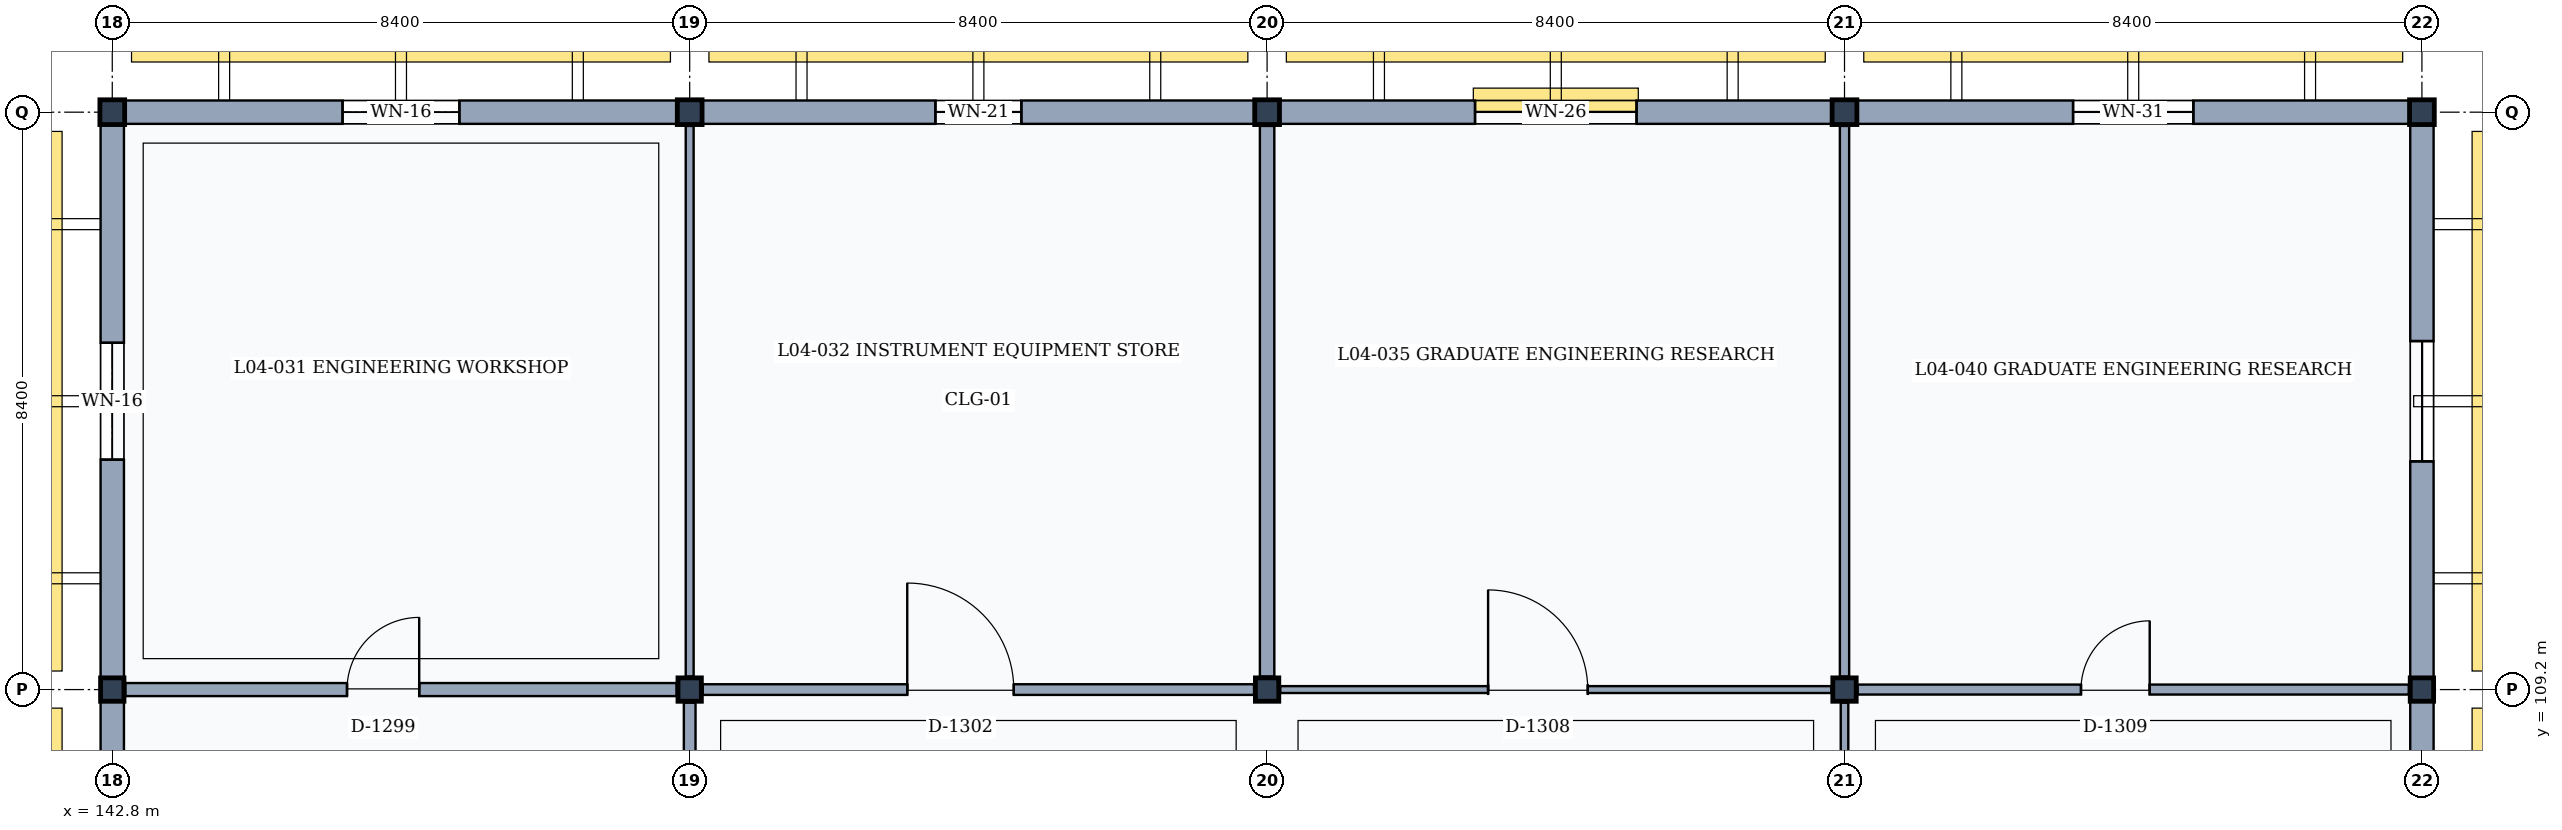
"""IFC4 building model, lengths in metres.
Left out: names, types, materials, properties, quantities, classifications, styles, units other than length and angle.
Written with IfcOpenShell. Run it as: python <this file> out.ifc"""

import sys

from ifc_helpers import new_model, si_unit, direction, frame, frame_2d, origin, origin_2d, place, context, subcontext, project, spatial, rectangle, extrude, element, fill, save


model = new_model("IFC4")
c1 = context("Model", 3, precision=1e-05, world=origin(), true_north=direction((0.0, 1.0)))
c2 = subcontext(c1, "Body", "Model", "MODEL_VIEW")
j1 = project(units=[si_unit("LENGTHUNIT", "METRE"), si_unit("PLANEANGLEUNIT", "RADIAN")], contexts=[c1])
p1 = place(None, origin())
s1 = spatial("IfcSite", under=j1, at=p1, CompositionType="ELEMENT")
p2 = place(p1, origin())
s2 = spatial("IfcBuilding", under=s1, at=p2, CompositionType="ELEMENT")
p3 = place(p2, frame((0.0, 0.0, 18.0)))
s3 = spatial("IfcBuildingStorey", under=s2, at=p3, CompositionType="ELEMENT", Elevation=18.0)
p4 = place(p3, frame((142.8, 109.2, 0.0), z_axis=(0.0, 0.0, 1.0), x_axis=(1.0, 0.0, 0.0)))
e1 = element("IfcColumn", 1, at=p4, inside=s3, PredefinedType="COLUMN", context=c2, shape_type="SweptSolid", body=[
    extrude(rectangle(XDim=0.34, YDim=0.34, at=origin_2d()), origin(), (0.0, 0.0, 1.0), 4.2),
])
p5 = place(p3, frame((142.8, 117.6, 0.0), z_axis=(0.0, 0.0, 1.0), x_axis=(1.0, 0.0, 0.0)))
e2 = element("IfcColumn", 2, at=p5, inside=s3, PredefinedType="COLUMN", context=c2, shape_type="SweptSolid", body=[
    extrude(rectangle(XDim=0.36, YDim=0.36, at=origin_2d()), origin(), (0.0, 0.0, 1.0), 4.2),
])
p6 = place(p3, frame((151.2, 109.2, 0.0), z_axis=(0.0, 0.0, 1.0), x_axis=(1.0, 0.0, 0.0)))
e3 = element("IfcColumn", 3, at=p6, inside=s3, PredefinedType="COLUMN", context=c2, shape_type="SweptSolid", body=[
    extrude(rectangle(XDim=0.34, YDim=0.34, at=origin_2d()), origin(), (0.0, 0.0, 1.0), 4.2),
])
p7 = place(p3, frame((151.2, 117.6, 0.0), z_axis=(0.0, 0.0, 1.0), x_axis=(1.0, 0.0, 0.0)))
e4 = element("IfcColumn", 4, at=p7, inside=s3, PredefinedType="COLUMN", context=c2, shape_type="SweptSolid", body=[
    extrude(rectangle(XDim=0.36, YDim=0.36, at=origin_2d()), origin(), (0.0, 0.0, 1.0), 4.2),
])
p8 = place(p3, frame((159.6, 109.2, 0.0), z_axis=(0.0, 0.0, 1.0), x_axis=(1.0, 0.0, 0.0)))
e5 = element("IfcColumn", 5, at=p8, inside=s3, PredefinedType="COLUMN", context=c2, shape_type="SweptSolid", body=[
    extrude(rectangle(XDim=0.34, YDim=0.34, at=origin_2d()), origin(), (0.0, 0.0, 1.0), 4.2),
])
p9 = place(p3, frame((159.6, 117.6, 0.0), z_axis=(0.0, 0.0, 1.0), x_axis=(1.0, 0.0, 0.0)))
e6 = element("IfcColumn", 6, at=p9, inside=s3, PredefinedType="COLUMN", context=c2, shape_type="SweptSolid", body=[
    extrude(rectangle(XDim=0.36, YDim=0.36, at=origin_2d()), origin(), (0.0, 0.0, 1.0), 4.2),
])
p10 = place(p3, frame((168.0, 109.2, 0.0), z_axis=(0.0, 0.0, 1.0), x_axis=(1.0, 0.0, 0.0)))
e7 = element("IfcColumn", 7, at=p10, inside=s3, PredefinedType="COLUMN", context=c2, shape_type="SweptSolid", body=[
    extrude(rectangle(XDim=0.34, YDim=0.34, at=origin_2d()), origin(), (0.0, 0.0, 1.0), 4.2),
])
p11 = place(p3, frame((168.0, 117.6, 0.0), z_axis=(0.0, 0.0, 1.0), x_axis=(1.0, 0.0, 0.0)))
e8 = element("IfcColumn", 8, at=p11, inside=s3, PredefinedType="COLUMN", context=c2, shape_type="SweptSolid", body=[
    extrude(rectangle(XDim=0.36, YDim=0.36, at=origin_2d()), origin(), (0.0, 0.0, 1.0), 4.2),
])
p12 = place(p3, frame((176.4, 109.2, 0.0), z_axis=(0.0, 0.0, 1.0), x_axis=(1.0, 0.0, 0.0)))
e9 = element("IfcColumn", 9, at=p12, inside=s3, PredefinedType="COLUMN", context=c2, shape_type="SweptSolid", body=[
    extrude(rectangle(XDim=0.34, YDim=0.34, at=origin_2d()), origin(), (0.0, 0.0, 1.0), 4.2),
])
p13 = place(p3, frame((176.4, 117.6, 0.0), z_axis=(0.0, 0.0, 1.0), x_axis=(1.0, 0.0, 0.0)))
e10 = element("IfcColumn", 10, at=p13, inside=s3, PredefinedType="COLUMN", context=c2, shape_type="SweptSolid", body=[
    extrude(rectangle(XDim=0.36, YDim=0.36, at=origin_2d()), origin(), (0.0, 0.0, 1.0), 4.2),
])
p14 = place(p3, frame((142.8, 100.98, 0.0), z_axis=(0.0, 0.0, 1.0), x_axis=(0.0, 1.0, 0.0)))
e11 = element("IfcWall", 11, at=p14, inside=s3, PredefinedType="SOLIDWALL", context=c2, shape_type="SweptSolid", body=[
    extrude(rectangle(XDim=8.05, YDim=0.34, at=frame_2d((4.025, 0.0))), origin(), (0.0, 0.0, 1.0), 3.36),
])
p15 = place(p14, frame((2.625, 0.0, 0.9)))
e12 = element("IfcOpeningElement", 12, at=p15, cuts=e11, PredefinedType="OPENING", context=c2, shape_type="SweptSolid", body=[
    extrude(rectangle(XDim=2.8, YDim=1.65, at=frame_2d((1.4, 0.825))), frame((0.0, 0.18, 0.0), z_axis=(0.0, -1.0, 0.0), x_axis=(1.0, 0.0, 0.0)), (0.0, 0.0, 1.0), 0.36),
])
p16 = place(p3, frame((142.98, 117.6, 0.0), z_axis=(0.0, 0.0, 1.0), x_axis=(1.0, 0.0, 0.0)))
e13 = element("IfcWall", 13, at=p16, inside=s3, PredefinedType="SOLIDWALL", context=c2, shape_type="SweptSolid", body=[
    extrude(rectangle(XDim=8.04, YDim=0.34, at=frame_2d((4.02, 0.0))), origin(), (0.0, 0.0, 1.0), 3.36),
])
p17 = place(p16, frame((3.17, 0.0, 0.9)))
e14 = element("IfcOpeningElement", 14, at=p17, cuts=e13, PredefinedType="OPENING", context=c2, shape_type="SweptSolid", body=[
    extrude(rectangle(XDim=1.7, YDim=1.55, at=frame_2d((0.85, 0.775))), frame((0.0, 0.18, 0.0), z_axis=(0.0, -1.0, 0.0), x_axis=(1.0, 0.0, 0.0)), (0.0, 0.0, 1.0), 0.36),
])
p18 = place(p3, frame((142.8, 109.37, 0.0), z_axis=(0.0, 0.0, 1.0), x_axis=(0.0, 1.0, 0.0)))
e15 = element("IfcWall", 15, at=p18, inside=s3, PredefinedType="SOLIDWALL", context=c2, shape_type="SweptSolid", body=[
    extrude(rectangle(XDim=8.05, YDim=0.34, at=frame_2d((4.025, 0.0))), origin(), (0.0, 0.0, 1.0), 3.36),
])
p19 = place(p18, frame((3.175, 0.0, 0.9)))
e16 = element("IfcOpeningElement", 16, at=p19, cuts=e15, PredefinedType="OPENING", context=c2, shape_type="SweptSolid", body=[
    extrude(rectangle(XDim=1.7, YDim=1.55, at=frame_2d((0.85, 0.775))), frame((0.0, 0.18, 0.0), z_axis=(0.0, -1.0, 0.0), x_axis=(1.0, 0.0, 0.0)), (0.0, 0.0, 1.0), 0.36),
])
p20 = place(p3, frame((151.38, 117.6, 0.0), z_axis=(0.0, 0.0, 1.0), x_axis=(1.0, 0.0, 0.0)))
e17 = element("IfcWall", 17, at=p20, inside=s3, PredefinedType="SOLIDWALL", context=c2, shape_type="SweptSolid", body=[
    extrude(rectangle(XDim=8.04, YDim=0.34, at=frame_2d((4.02, 0.0))), origin(), (0.0, 0.0, 1.0), 3.36),
])
p21 = place(p20, frame((3.395, 0.0, 0.9)))
e18 = element("IfcOpeningElement", 18, at=p21, cuts=e17, PredefinedType="OPENING", context=c2, shape_type="SweptSolid", body=[
    extrude(rectangle(XDim=1.25, YDim=1.7, at=frame_2d((0.625, 0.85))), frame((0.0, 0.18, 0.0), z_axis=(0.0, -1.0, 0.0), x_axis=(1.0, 0.0, 0.0)), (0.0, 0.0, 1.0), 0.36),
])
p22 = place(p3, frame((159.78, 117.6, 0.0), z_axis=(0.0, 0.0, 1.0), x_axis=(1.0, 0.0, 0.0)))
e19 = element("IfcWall", 19, at=p22, inside=s3, PredefinedType="SOLIDWALL", context=c2, shape_type="SweptSolid", body=[
    extrude(rectangle(XDim=8.04, YDim=0.34, at=frame_2d((4.02, 0.0))), origin(), (0.0, 0.0, 1.0), 3.36),
])
p23 = place(p22, frame((2.845, 0.0, 0.9)))
e20 = element("IfcOpeningElement", 20, at=p23, cuts=e19, PredefinedType="OPENING", context=c2, shape_type="SweptSolid", body=[
    extrude(rectangle(XDim=2.35, YDim=1.95, at=frame_2d((1.175, 0.975))), frame((0.0, 0.18, 0.0), z_axis=(0.0, -1.0, 0.0), x_axis=(1.0, 0.0, 0.0)), (0.0, 0.0, 1.0), 0.36),
])
p24 = place(p3, frame((176.4, 109.03, 0.0), z_axis=(0.0, 0.0, 1.0), x_axis=(0.0, -1.0, 0.0)))
e21 = element("IfcWall", 21, at=p24, inside=s3, PredefinedType="SOLIDWALL", context=c2, shape_type="SweptSolid", body=[
    extrude(rectangle(XDim=8.05, YDim=0.34, at=frame_2d((4.025, 0.0))), origin(), (0.0, 0.0, 1.0), 3.36),
])
p25 = place(p24, frame((2.65, 0.0, 0.9)))
e22 = element("IfcOpeningElement", 22, at=p25, cuts=e21, PredefinedType="OPENING", context=c2, shape_type="SweptSolid", body=[
    extrude(rectangle(XDim=2.75, YDim=1.85, at=frame_2d((1.375, 0.925))), frame((0.0, 0.18, 0.0), z_axis=(0.0, -1.0, 0.0), x_axis=(1.0, 0.0, 0.0)), (0.0, 0.0, 1.0), 0.36),
])
p26 = place(p3, frame((168.18, 117.6, 0.0), z_axis=(0.0, 0.0, 1.0), x_axis=(1.0, 0.0, 0.0)))
e23 = element("IfcWall", 23, at=p26, inside=s3, PredefinedType="SOLIDWALL", context=c2, shape_type="SweptSolid", body=[
    extrude(rectangle(XDim=8.04, YDim=0.34, at=frame_2d((4.02, 0.0))), origin(), (0.0, 0.0, 1.0), 3.36),
])
p27 = place(p26, frame((3.145, 0.0, 0.9)))
e24 = element("IfcOpeningElement", 24, at=p27, cuts=e23, PredefinedType="OPENING", context=c2, shape_type="SweptSolid", body=[
    extrude(rectangle(XDim=1.75, YDim=1.85, at=frame_2d((0.875, 0.925))), frame((0.0, 0.18, 0.0), z_axis=(0.0, -1.0, 0.0), x_axis=(1.0, 0.0, 0.0)), (0.0, 0.0, 1.0), 0.36),
])
p28 = place(p3, frame((176.4, 117.42, 0.0), z_axis=(0.0, 0.0, 1.0), x_axis=(0.0, -1.0, 0.0)))
e25 = element("IfcWall", 25, at=p28, inside=s3, PredefinedType="SOLIDWALL", context=c2, shape_type="SweptSolid", body=[
    extrude(rectangle(XDim=8.05, YDim=0.34, at=frame_2d((4.025, 0.0))), origin(), (0.0, 0.0, 1.0), 3.36),
])
p29 = place(p28, frame((3.15, 0.0, 0.9)))
e26 = element("IfcOpeningElement", 26, at=p29, cuts=e25, PredefinedType="OPENING", context=c2, shape_type="SweptSolid", body=[
    extrude(rectangle(XDim=1.75, YDim=1.85, at=frame_2d((0.875, 0.925))), frame((0.0, 0.18, 0.0), z_axis=(0.0, -1.0, 0.0), x_axis=(1.0, 0.0, 0.0)), (0.0, 0.0, 1.0), 0.36),
])
p30 = place(p3, frame((151.2, 101.0, 0.0), z_axis=(0.0, 0.0, 1.0), x_axis=(0.0, 1.0, 0.0)))
e27 = element("IfcWall", 27, at=p30, inside=s3, PredefinedType="PARTITIONING", context=c2, shape_type="SweptSolid", body=[
    extrude(rectangle(XDim=8.01, YDim=0.17, at=frame_2d((4.005, 0.0))), origin(), (0.0, 0.0, 1.0), 3.32),
])
p31 = place(p30, frame((2.925, 0.0, 0.0)))
e28 = element("IfcOpeningElement", 28, at=p31, cuts=e27, PredefinedType="OPENING", context=c2, shape_type="SweptSolid", body=[
    extrude(rectangle(XDim=1.65, YDim=2.25, at=frame_2d((0.825, 1.125))), frame((0.0, 0.095, 0.0), z_axis=(0.0, -1.0, 0.0), x_axis=(1.0, 0.0, 0.0)), (0.0, 0.0, 1.0), 0.19),
])
p32 = place(p3, frame((142.99, 109.2, 0.0), z_axis=(0.0, 0.0, 1.0), x_axis=(1.0, 0.0, 0.0)))
e29 = element("IfcWall", 29, at=p32, inside=s3, PredefinedType="PARTITIONING", context=c2, shape_type="SweptSolid", body=[
    extrude(rectangle(XDim=8.02, YDim=0.19, at=frame_2d((4.01, 0.0))), origin(), (0.0, 0.0, 1.0), 3.32),
])
p33 = place(p32, frame((3.225, 0.0, 0.0)))
e30 = element("IfcOpeningElement", 30, at=p33, cuts=e29, PredefinedType="OPENING", context=c2, shape_type="SweptSolid", body=[
    extrude(rectangle(XDim=1.05, YDim=2.2, at=frame_2d((0.525, 1.1))), frame((0.0, 0.105, 0.0), z_axis=(0.0, -1.0, 0.0), x_axis=(1.0, 0.0, 0.0)), (0.0, 0.0, 1.0), 0.21),
])
p34 = place(p3, frame((151.2, 109.39, 0.0), z_axis=(0.0, 0.0, 1.0), x_axis=(0.0, 1.0, 0.0)))
e31 = element("IfcWall", 31, at=p34, inside=s3, PredefinedType="PARTITIONING", context=c2, shape_type="SweptSolid", body=[
    extrude(rectangle(XDim=8.01, YDim=0.115, at=frame_2d((4.005, 0.0))), origin(), (0.0, 0.0, 1.0), 3.32),
])
p35 = place(p3, frame((151.39, 109.2, 0.0), z_axis=(0.0, 0.0, 1.0), x_axis=(1.0, 0.0, 0.0)))
e32 = element("IfcWall", 32, at=p35, inside=s3, PredefinedType="PARTITIONING", context=c2, shape_type="SweptSolid", body=[
    extrude(rectangle(XDim=8.02, YDim=0.155, at=frame_2d((4.01, 0.0))), origin(), (0.0, 0.0, 1.0), 3.32),
])
p36 = place(p35, frame((2.975, 0.0, 0.0)))
e33 = element("IfcOpeningElement", 33, at=p36, cuts=e32, PredefinedType="OPENING", context=c2, shape_type="SweptSolid", body=[
    extrude(rectangle(XDim=1.55, YDim=2.35, at=frame_2d((0.775, 1.175))), frame((0.0, 0.087, 0.0), z_axis=(0.0, -1.0, 0.0), x_axis=(1.0, 0.0, 0.0)), (0.0, 0.0, 1.0), 0.175),
])
p37 = place(p3, frame((159.6, 109.39, 0.0), z_axis=(0.0, 0.0, 1.0), x_axis=(0.0, 1.0, 0.0)))
e34 = element("IfcWall", 34, at=p37, inside=s3, PredefinedType="PARTITIONING", context=c2, shape_type="SweptSolid", body=[
    extrude(rectangle(XDim=8.01, YDim=0.21, at=frame_2d((4.005, 0.0))), origin(), (0.0, 0.0, 1.0), 3.32),
])
p38 = place(p3, frame((168.0, 101.0, 0.0), z_axis=(0.0, 0.0, 1.0), x_axis=(0.0, 1.0, 0.0)))
e35 = element("IfcWall", 35, at=p38, inside=s3, PredefinedType="PARTITIONING", context=c2, shape_type="SweptSolid", body=[
    extrude(rectangle(XDim=8.01, YDim=0.11, at=frame_2d((4.005, 0.0))), origin(), (0.0, 0.0, 1.0), 3.32),
])
p39 = place(p38, frame((3.075, 0.0, 0.0)))
e36 = element("IfcOpeningElement", 36, at=p39, cuts=e35, PredefinedType="OPENING", context=c2, shape_type="SweptSolid", body=[
    extrude(rectangle(XDim=1.35, YDim=2.25, at=frame_2d((0.675, 1.125))), frame((0.0, 0.065, 0.0), z_axis=(0.0, -1.0, 0.0), x_axis=(1.0, 0.0, 0.0)), (0.0, 0.0, 1.0), 0.13),
])
p40 = place(p3, frame((159.79, 109.2, 0.0), z_axis=(0.0, 0.0, 1.0), x_axis=(1.0, 0.0, 0.0)))
e37 = element("IfcWall", 37, at=p40, inside=s3, PredefinedType="MOVABLE", context=c2, shape_type="SweptSolid", body=[
    extrude(rectangle(XDim=8.02, YDim=0.1, at=frame_2d((4.01, 0.0))), origin(), (0.0, 0.0, 1.0), 3.32),
])
p41 = place(p40, frame((3.025, 0.0, 0.0)))
e38 = element("IfcOpeningElement", 38, at=p41, cuts=e37, PredefinedType="OPENING", context=c2, shape_type="SweptSolid", body=[
    extrude(rectangle(XDim=1.45, YDim=2.35, at=frame_2d((0.725, 1.175))), frame((0.0, 0.06, 0.0), z_axis=(0.0, -1.0, 0.0), x_axis=(1.0, 0.0, 0.0)), (0.0, 0.0, 1.0), 0.12),
])
p42 = place(p3, frame((168.0, 109.39, 0.0), z_axis=(0.0, 0.0, 1.0), x_axis=(0.0, 1.0, 0.0)))
e39 = element("IfcWall", 39, at=p42, inside=s3, PredefinedType="PARTITIONING", context=c2, shape_type="SweptSolid", body=[
    extrude(rectangle(XDim=8.01, YDim=0.135, at=frame_2d((4.005, 0.0))), origin(), (0.0, 0.0, 1.0), 3.32),
])
p43 = place(p3, frame((168.19, 109.2, 0.0), z_axis=(0.0, 0.0, 1.0), x_axis=(1.0, 0.0, 0.0)))
e40 = element("IfcWall", 40, at=p43, inside=s3, PredefinedType="PARTITIONING", context=c2, shape_type="SweptSolid", body=[
    extrude(rectangle(XDim=8.02, YDim=0.145, at=frame_2d((4.01, 0.0))), origin(), (0.0, 0.0, 1.0), 3.32),
])
p44 = place(p43, frame((3.25, 0.0, 0.0)))
e41 = element("IfcOpeningElement", 41, at=p44, cuts=e40, PredefinedType="OPENING", context=c2, shape_type="SweptSolid", body=[
    extrude(rectangle(XDim=1.0, YDim=2.15, at=frame_2d((0.5, 1.075))), frame((0.0, 0.083, 0.0), z_axis=(0.0, -1.0, 0.0), x_axis=(1.0, 0.0, 0.0)), (0.0, 0.0, 1.0), 0.165),
])
p45 = place(p17, origin())
e42 = element("IfcWindow", 42, at=p45, inside=s3, PartitioningType="SINGLE_PANEL", PredefinedType="WINDOW", context=c2, shape_type="SweptSolid", body=[
    extrude(rectangle(XDim=1.7, YDim=1.55, at=frame_2d((0.85, 0.775))), frame((0.0, 0.03, 0.0), z_axis=(0.0, -1.0, 0.0), x_axis=(1.0, 0.0, 0.0)), (0.0, 0.0, 1.0), 0.06),
])
fill(e14, e42)
p46 = place(p19, origin())
e43 = element("IfcWindow", 43, at=p46, inside=s3, PartitioningType="SINGLE_PANEL", PredefinedType="WINDOW", context=c2, shape_type="SweptSolid", body=[
    extrude(rectangle(XDim=1.7, YDim=1.55, at=frame_2d((0.85, 0.775))), frame((0.0, 0.03, 0.0), z_axis=(0.0, -1.0, 0.0), x_axis=(1.0, 0.0, 0.0)), (0.0, 0.0, 1.0), 0.06),
])
fill(e16, e43)
p47 = place(p21, origin())
e44 = element("IfcWindow", 44, at=p47, inside=s3, PartitioningType="SINGLE_PANEL", PredefinedType="WINDOW", context=c2, shape_type="SweptSolid", body=[
    extrude(rectangle(XDim=1.25, YDim=1.7, at=frame_2d((0.625, 0.85))), frame((0.0, 0.03, 0.0), z_axis=(0.0, -1.0, 0.0), x_axis=(1.0, 0.0, 0.0)), (0.0, 0.0, 1.0), 0.06),
])
fill(e18, e44)
p48 = place(p23, origin())
e45 = element("IfcWindow", 45, at=p48, inside=s3, PartitioningType="SINGLE_PANEL", PredefinedType="WINDOW", context=c2, shape_type="SweptSolid", body=[
    extrude(rectangle(XDim=2.35, YDim=1.95, at=frame_2d((1.175, 0.975))), frame((0.0, 0.03, 0.0), z_axis=(0.0, -1.0, 0.0), x_axis=(1.0, 0.0, 0.0)), (0.0, 0.0, 1.0), 0.06),
])
fill(e20, e45)
p49 = place(p27, origin())
e46 = element("IfcWindow", 46, at=p49, inside=s3, PartitioningType="SINGLE_PANEL", PredefinedType="WINDOW", context=c2, shape_type="SweptSolid", body=[
    extrude(rectangle(XDim=1.75, YDim=1.85, at=frame_2d((0.875, 0.925))), frame((0.0, 0.03, 0.0), z_axis=(0.0, -1.0, 0.0), x_axis=(1.0, 0.0, 0.0)), (0.0, 0.0, 1.0), 0.06),
])
fill(e24, e46)
p50 = place(p29, origin())
e47 = element("IfcWindow", 47, at=p50, inside=s3, PartitioningType="SINGLE_PANEL", PredefinedType="WINDOW", context=c2, shape_type="SweptSolid", body=[
    extrude(rectangle(XDim=1.75, YDim=1.85, at=frame_2d((0.875, 0.925))), frame((0.0, 0.03, 0.0), z_axis=(0.0, -1.0, 0.0), x_axis=(1.0, 0.0, 0.0)), (0.0, 0.0, 1.0), 0.06),
])
fill(e26, e47)
p51 = place(p33, origin())
e48 = element("IfcDoor", 48, at=p51, inside=s3, OperationType="SINGLE_SWING_RIGHT", PredefinedType="DOOR", context=c2, shape_type="SweptSolid", body=[
    extrude(rectangle(XDim=1.05, YDim=2.2, at=frame_2d((0.525, 1.1))), frame((0.0, 0.025, 0.0), z_axis=(0.0, -1.0, 0.0), x_axis=(1.0, 0.0, 0.0)), (0.0, 0.0, 1.0), 0.05),
])
fill(e30, e48)
p52 = place(p36, origin())
e49 = element("IfcDoor", 49, at=p52, inside=s3, OperationType="SINGLE_SWING_LEFT", PredefinedType="DOOR", context=c2, shape_type="SweptSolid", body=[
    extrude(rectangle(XDim=1.55, YDim=2.35, at=frame_2d((0.775, 1.175))), frame((0.0, 0.025, 0.0), z_axis=(0.0, -1.0, 0.0), x_axis=(1.0, 0.0, 0.0)), (0.0, 0.0, 1.0), 0.05),
])
fill(e33, e49)
p53 = place(p41, origin())
e50 = element("IfcDoor", 50, at=p53, inside=s3, OperationType="SINGLE_SWING_LEFT", PredefinedType="DOOR", context=c2, shape_type="SweptSolid", body=[
    extrude(rectangle(XDim=1.45, YDim=2.35, at=frame_2d((0.725, 1.175))), frame((0.0, 0.025, 0.0), z_axis=(0.0, -1.0, 0.0), x_axis=(1.0, 0.0, 0.0)), (0.0, 0.0, 1.0), 0.05),
])
fill(e38, e50)
p54 = place(p44, origin())
e51 = element("IfcDoor", 51, at=p54, inside=s3, OperationType="SINGLE_SWING_RIGHT", PredefinedType="DOOR", context=c2, shape_type="SweptSolid", body=[
    extrude(rectangle(XDim=1.0, YDim=2.15, at=frame_2d((0.5, 1.075))), frame((0.0, 0.025, 0.0), z_axis=(0.0, -1.0, 0.0), x_axis=(1.0, 0.0, 0.0)), (0.0, 0.0, 1.0), 0.05),
])
fill(e41, e51)
save(model, sys.argv[1])
